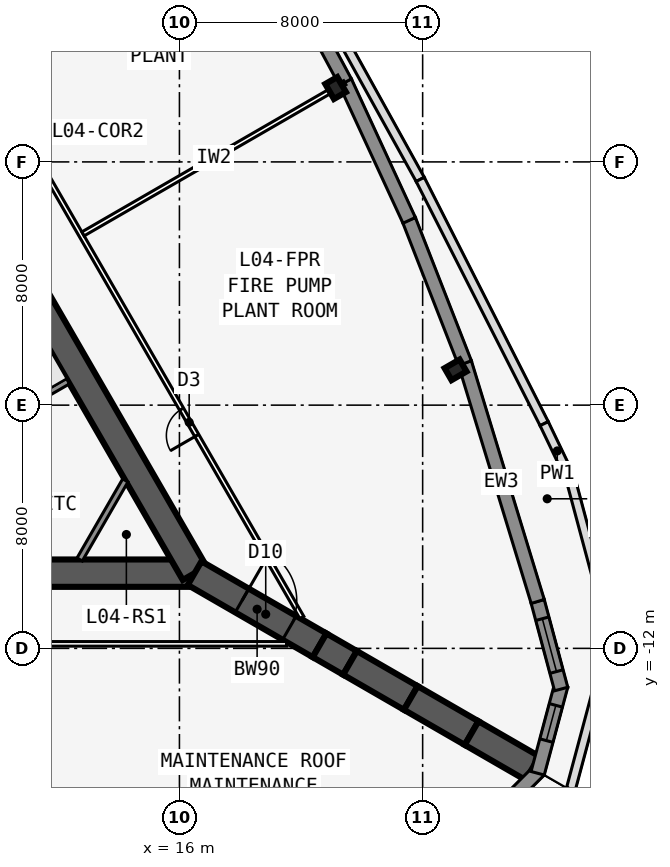
"""IFC4 building model, lengths in metres.
Left out: names, types, materials, properties, quantities, classifications, styles, units other than length and angle.
Written with IfcOpenShell. Run it as: python <this file> out.ifc"""

import sys

from ifc_helpers import new_model, si_unit, direction, frame, frame_2d, origin, origin_2d, place, context, subcontext, project, spatial, polyline, rectangle, i_section, outline, extrude, element, fill, save


model = new_model("IFC4")
c1 = context("Model", 3, precision=1e-05, world=origin(), true_north=direction((0.0, 1.0)))
c2 = subcontext(c1, "Body", "Model", "MODEL_VIEW")
j1 = project(units=[si_unit("LENGTHUNIT", "METRE"), si_unit("PLANEANGLEUNIT", "RADIAN")], contexts=[c1])
p1 = place(None, origin())
s1 = spatial("IfcSite", under=j1, at=p1, CompositionType="ELEMENT")
p2 = place(p1, origin())
s2 = spatial("IfcBuilding", under=s1, at=p2, CompositionType="ELEMENT")
p3 = place(p2, frame((0.0, 0.0, 22.5)))
s3 = spatial("IfcBuildingStorey", under=s2, at=p3, CompositionType="ELEMENT", Elevation=22.5)
p4 = place(p3, frame((-16.5, -9.526, 0.0), z_axis=(0.0, 0.0, 1.0), x_axis=(1.0, 0.0, 0.0)))
e1 = element("IfcWall", 1, at=p4, inside=s3, PredefinedType="SHEAR", context=c2, shape_type="SweptSolid", body=[
    extrude(rectangle(XDim=33.0, YDim=0.9, at=frame_2d((16.5, 0.0))), origin(), (0.0, 0.0, 1.0), 6.0),
])
p5 = place(p4, frame((14.05, 0.0, 0.0)))
e2 = element("IfcOpeningElement", 2, at=p5, cuts=e1, PredefinedType="OPENING", context=c2, shape_type="SweptSolid", body=[
    extrude(rectangle(XDim=1.8, YDim=2.13, at=frame_2d((0.9, 1.065))), frame((0.0, 0.46, 0.0), z_axis=(0.0, -1.0, 0.0), x_axis=(1.0, 0.0, 0.0)), (0.0, 0.0, 1.0), 0.92),
])
p6 = place(p3, frame((16.5, -9.526, 0.0), z_axis=(0.0, 0.0, 1.0), x_axis=(-0.499999749417, 0.866025548458, 0.0)))
e3 = element("IfcWall", 3, at=p6, inside=s3, PredefinedType="SHEAR", context=c2, shape_type="SweptSolid", body=[
    extrude(rectangle(XDim=33.0, YDim=0.9, at=frame_2d((16.5, 0.0))), origin(), (0.0, 0.0, 1.0), 6.0),
])
p7 = place(p6, frame((14.15, 0.0, 0.0)))
e4 = element("IfcOpeningElement", 4, at=p7, cuts=e3, PredefinedType="OPENING", context=c2, shape_type="SweptSolid", body=[
    extrude(rectangle(XDim=1.8, YDim=2.13, at=frame_2d((0.9, 1.065))), frame((0.0, 0.46, 0.0), z_axis=(0.0, -1.0, 0.0), x_axis=(1.0, 0.0, 0.0)), (0.0, 0.0, 1.0), 0.92),
])
p8 = place(p6, frame((12.6, 0.0, 0.0)))
e5 = element("IfcOpeningElement", 5, at=p8, cuts=e3, PredefinedType="OPENING", context=c2, shape_type="SweptSolid", body=[
    extrude(rectangle(XDim=1.0, YDim=2.13, at=frame_2d((0.5, 1.065))), frame((0.0, 0.46, 0.0), z_axis=(0.0, -1.0, 0.0), x_axis=(1.0, 0.0, 0.0)), (0.0, 0.0, 1.0), 0.92),
])
p9 = place(p3, frame((9.629, -4.775, 0.0), z_axis=(0.0, 0.0, 1.0), x_axis=(0.866022959057, 0.500004234368, 0.0)))
e6 = element("IfcWall", 6, at=p9, inside=s3, PredefinedType="SOLIDWALL", context=c2, shape_type="SweptSolid", body=[
    extrude(rectangle(XDim=3.125, YDim=0.2, at=frame_2d((1.562, 0.0))), origin(), (0.0, 0.0, 1.0), 5.835),
])
p10 = place(p3, frame((16.5, -9.526, 0.0), z_axis=(0.0, 0.0, 1.0), x_axis=(0.866031398331, -0.499989616998, 0.0)))
e7 = element("IfcWall", 7, at=p10, inside=s3, PredefinedType="SHEAR", context=c2, shape_type="SweptSolid", body=[
    extrude(rectangle(XDim=4.746, YDim=0.9, at=frame_2d((2.373, 0.0))), origin(), (0.0, 0.0, 1.0), 6.0),
])
p11 = place(p10, frame((1.8, 0.0, 0.0)))
e8 = element("IfcOpeningElement", 8, at=p11, cuts=e7, PredefinedType="OPENING", context=c2, shape_type="SweptSolid", body=[
    extrude(rectangle(XDim=1.8, YDim=2.13, at=frame_2d((0.9, 1.065))), frame((0.0, 0.46, 0.0), z_axis=(0.0, -1.0, 0.0), x_axis=(1.0, 0.0, 0.0)), (0.0, 0.0, 1.0), 0.92),
])
p12 = place(p3, frame((20.61, -11.899, 0.0), z_axis=(0.0, 0.0, 1.0), x_axis=(0.866009537788, -0.500027479704, 0.0)))
e9 = element("IfcWall", 9, at=p12, inside=s3, PredefinedType="SHEAR", context=c2, shape_type="SweptSolid", body=[
    extrude(rectangle(XDim=1.155, YDim=0.9, at=frame_2d((0.577, 0.0))), origin(), (0.0, 0.0, 1.0), 6.0),
])
for number, where, z_axis, x_axis in (
    (10, (21.61, -12.477, 0.0), (0.0, 0.0, 1.0), (0.866, -0.5, 0.0)),
    (11, (23.61, -13.631, 0.0), (0.0, 0.0, 1.0), (0.866, -0.5, 0.0)),
    (12, (25.61, -14.786, 0.0), (0.0, 0.0, 1.0), (0.866, -0.5, 0.0)),
):
    element("IfcWall", number, at=place(p3, frame(where, z_axis=z_axis, x_axis=x_axis)), inside=s3, PredefinedType="SHEAR", context=c2, shape_type="SweptSolid", body=[
        extrude(rectangle(XDim=2.309, YDim=0.9, at=frame_2d((1.155, 0.0))), origin(), (0.0, 0.0, 1.0), 6.0),
    ])
for number, where, z_axis, x_axis in (
    (13, (25.083, -2.839, 0.0), (0.0, 0.0, 1.0), (-0.5, 0.866, 0.0)),
    (14, (21.137, 6.43, 0.0), (0.0, 0.0, 1.0), (0.866, 0.5, 0.0)),
):
    element("IfcColumn", number, at=place(p3, frame(where, z_axis=z_axis, x_axis=x_axis)), inside=s3, PredefinedType="COLUMN", context=c2, shape_type="SweptSolid", body=[
        extrude(i_section(OverallWidth=0.455, OverallDepth=0.569, WebThickness=0.078, FlangeThickness=0.125, at=origin_2d()), origin(), (0.0, 0.0, 1.0), 6.0),
    ])
p13 = place(p3, frame((15.312, 8.84, 0.0), z_axis=(0.0, 0.0, 1.0), x_axis=(0.866025403784, 0.5, 0.0)))
e15 = element("IfcColumn", 15, at=p13, inside=s3, PredefinedType="COLUMN", context=c2, shape_type="SweptSolid", body=[
    extrude(rectangle(XDim=2.4, YDim=2.4, at=origin_2d()), origin(), (0.0, 0.0, 1.0), 6.0),
])
p14 = place(p3, frame((25.728, -18.12, 0.0), z_axis=(0.0, 0.0, 1.0), x_axis=(0.707025086683, 0.707188466253, 0.0)))
e16 = element("IfcWall", 16, at=p14, inside=s3, PredefinedType="SOLIDWALL", context=c2, shape_type="SweptSolid", body=[
    extrude(outline(polyline([(2.989, 0.225), (2.93, 0.225), (2.438, 0.093), (2.402, 0.225), (0.0, 0.225), (0.0, -0.225), (2.989, -0.225), (2.989, 0.225)])), origin(), (0.0, 0.0, 1.0), 5.835),
])
p15 = place(p14, frame((0.676, 0.0, 0.9)))
e17 = element("IfcOpeningElement", 17, at=p15, cuts=e16, PredefinedType="OPENING", context=c2, shape_type="SweptSolid", body=[
    extrude(rectangle(XDim=1.2, YDim=3.6, at=frame_2d((0.6, 1.8))), frame((0.0, 0.235, 0.0), z_axis=(0.0, -1.0, 0.0), x_axis=(1.0, 0.0, 0.0)), (0.0, 0.0, 1.0), 0.47),
])
p16 = place(p3, frame((27.783, -16.108, 0.0), z_axis=(0.0, 0.0, 1.0), x_axis=(0.258801419081, 0.965930548995, 0.0)))
e18 = element("IfcWall", 18, at=p16, inside=s3, PredefinedType="SOLIDWALL", context=c2, shape_type="SweptSolid", body=[
    extrude(outline(polyline([(2.989, 0.225), (0.586, 0.225), (0.551, 0.093), (0.06, 0.225), (0.0, 0.225), (0.0, -0.225), (2.989, -0.225), (2.989, 0.225)])), origin(), (0.0, 0.0, 1.0), 5.835),
])
p17 = place(p16, frame((1.113, 0.0, 0.9)))
e19 = element("IfcOpeningElement", 19, at=p17, cuts=e18, PredefinedType="OPENING", context=c2, shape_type="SweptSolid", body=[
    extrude(rectangle(XDim=1.2, YDim=3.6, at=frame_2d((0.6, 1.8))), frame((0.0, 0.235, 0.0), z_axis=(0.0, -1.0, 0.0), x_axis=(1.0, 0.0, 0.0)), (0.0, 0.0, 1.0), 0.47),
])
p18 = place(p3, frame((28.556, -13.337, 0.0), z_axis=(0.0, 0.0, 1.0), x_axis=(-0.258780998834, 0.965936019953, 0.0)))
e20 = element("IfcWall", 20, at=p18, inside=s3, PredefinedType="SOLIDWALL", context=c2, shape_type="SweptSolid", body=[
    extrude(rectangle(XDim=2.989, YDim=0.45, at=frame_2d((1.494, 0.0))), origin(), (0.0, 0.0, 1.0), 5.835),
])
p19 = place(p18, frame((0.594, 0.0, 0.9)))
e21 = element("IfcOpeningElement", 21, at=p19, cuts=e20, PredefinedType="OPENING", context=c2, shape_type="SweptSolid", body=[
    extrude(rectangle(XDim=1.8, YDim=3.6, at=frame_2d((0.9, 1.8))), frame((0.0, 0.235, 0.0), z_axis=(0.0, -1.0, 0.0), x_axis=(1.0, 0.0, 0.0)), (0.0, 0.0, 1.0), 0.47),
])
p20 = place(p3, frame((27.785, -10.458, 0.0), z_axis=(0.0, 0.0, 1.0), x_axis=(-0.291997961298, 0.956418940945, 0.0)))
e22 = element("IfcWall", 22, at=p20, inside=s3, PredefinedType="SOLIDWALL", context=c2, shape_type="SweptSolid", body=[
    extrude(outline(polyline([(0.0, 0.0), (8.211, 0.0), (8.211, 5.835), (0.0, 5.835), (0.0, 0.0)]), holes=[polyline([(6.406, 2.917), (6.327, 3.513), (6.097, 4.067), (5.732, 4.544), (5.256, 4.909), (4.701, 5.139), (4.106, 5.218), (3.51, 5.139), (2.956, 4.909), (2.479, 4.544), (2.114, 4.067), (1.884, 3.513), (1.806, 2.917), (1.884, 2.322), (2.114, 1.768), (2.479, 1.291), (2.956, 0.926), (3.51, 0.696), (4.106, 0.617), (4.701, 0.696), (5.256, 0.926), (5.732, 1.291), (6.097, 1.768), (6.327, 2.322), (6.406, 2.917)])]), frame((0.0, 0.225, 0.0), z_axis=(0.0, -1.0, 0.0), x_axis=(1.0, 0.0, 0.0)), (0.0, 0.0, 1.0), 0.45),
])
p21 = place(p3, frame((25.393, -2.621, 0.0), z_axis=(0.0, 0.0, 1.0), x_axis=(-0.363971587738, 0.931410051116, 0.0)))
e23 = element("IfcWall", 23, at=p21, inside=s3, PredefinedType="SOLIDWALL", context=c2, shape_type="SweptSolid", body=[
    extrude(outline(polyline([(0.0, 0.0), (5.058, 0.0), (5.058, 5.835), (0.0, 5.835), (0.0, 0.0)]), holes=[polyline([(4.429, 2.917), (4.364, 3.409), (4.174, 3.867), (3.872, 4.261), (3.479, 4.563), (3.021, 4.753), (2.529, 4.817), (2.037, 4.753), (1.579, 4.563), (1.185, 4.261), (0.883, 3.867), (0.694, 3.409), (0.629, 2.917), (0.694, 2.426), (0.883, 1.968), (1.185, 1.574), (1.579, 1.272), (2.037, 1.082), (2.529, 1.018), (3.021, 1.082), (3.479, 1.272), (3.872, 1.574), (4.174, 1.968), (4.364, 2.426), (4.429, 2.917)])]), frame((0.0, 0.225, 0.0), z_axis=(0.0, -1.0, 0.0), x_axis=(1.0, 0.0, 0.0)), (0.0, 0.0, 1.0), 0.45),
])
p22 = place(p3, frame((23.557, 2.077, 0.0), z_axis=(0.0, 0.0, 1.0), x_axis=(-0.419203100754, 0.907892482796, 0.0)))
e24 = element("IfcWall", 24, at=p22, inside=s3, PredefinedType="SOLIDWALL", context=c2, shape_type="SweptSolid", body=[
    extrude(outline(polyline([(0.0, 0.0), (5.021, 0.0), (5.021, 5.835), (0.0, 5.835), (0.0, 0.0)]), holes=[polyline([(4.41, 2.917), (4.346, 3.409), (4.156, 3.867), (3.854, 4.261), (3.46, 4.563), (3.002, 4.753), (2.51, 4.817), (2.019, 4.753), (1.56, 4.563), (1.167, 4.261), (0.865, 3.867), (0.675, 3.409), (0.61, 2.917), (0.675, 2.426), (0.865, 1.968), (1.167, 1.574), (1.56, 1.272), (2.019, 1.082), (2.51, 1.018), (3.002, 1.082), (3.46, 1.272), (3.854, 1.574), (4.156, 1.968), (4.346, 2.426), (4.41, 2.917)])]), frame((0.0, 0.225, 0.0), z_axis=(0.0, -1.0, 0.0), x_axis=(1.0, 0.0, 0.0)), (0.0, 0.0, 1.0), 0.45),
])
p23 = place(p3, frame((21.458, 6.624, 0.0), z_axis=(0.0, 0.0, 1.0), x_axis=(-0.473412820489, 0.880840678782, 0.0)))
e25 = element("IfcWall", 25, at=p23, inside=s3, PredefinedType="SOLIDWALL", context=c2, shape_type="SweptSolid", body=[
    extrude(outline(polyline([(0.0, 0.0), (5.002, 0.0), (5.002, 5.835), (0.0, 5.835), (0.0, 0.0)]), holes=[polyline([(4.401, 2.917), (4.336, 3.409), (4.146, 3.867), (3.845, 4.261), (3.451, 4.563), (2.993, 4.753), (2.501, 4.817), (2.01, 4.753), (1.551, 4.563), (1.158, 4.261), (0.856, 3.867), (0.666, 3.409), (0.601, 2.917), (0.666, 2.426), (0.856, 1.968), (1.158, 1.574), (1.551, 1.272), (2.01, 1.082), (2.501, 1.018), (2.993, 1.082), (3.451, 1.272), (3.845, 1.574), (4.146, 1.968), (4.336, 2.426), (4.401, 2.917)])]), frame((0.0, 0.225, 0.0), z_axis=(0.0, -1.0, 0.0), x_axis=(1.0, 0.0, 0.0)), (0.0, 0.0, 1.0), 0.45),
])
p24 = place(p3, frame((19.563, 11.295, 0.0), z_axis=(0.0, 0.0, 1.0), x_axis=(0.484315141127, -0.874893618719, 0.0)))
e26 = element("IfcWall", 26, at=p24, inside=s3, PredefinedType="PARAPET", context=c2, shape_type="SweptSolid", body=[
    extrude(rectangle(XDim=8.996, YDim=0.3, at=frame_2d((4.498, 0.0))), origin(), (0.0, 0.0, 1.0), 1.1),
])
p25 = place(p3, frame((23.92, 3.424, 0.0), z_axis=(0.0, 0.0, 1.0), x_axis=(0.452582301023, -0.891722636699, 0.0)))
e27 = element("IfcWall", 27, at=p25, inside=s3, PredefinedType="PARAPET", context=c2, shape_type="SweptSolid", body=[
    extrude(rectangle(XDim=9.009, YDim=0.3, at=frame_2d((4.504, 0.0))), origin(), (0.0, 0.0, 1.0), 1.1),
])
p26 = place(p3, frame((27.997, -4.609, 0.0), z_axis=(0.0, 0.0, 1.0), x_axis=(0.432878608611, -0.90145222292, 0.0)))
e28 = element("IfcWall", 28, at=p26, inside=s3, PredefinedType="PARAPET", context=c2, shape_type="SweptSolid", body=[
    extrude(rectangle(XDim=1.99, YDim=0.3, at=frame_2d((0.995, 0.0))), origin(), (0.0, 0.0, 1.0), 1.1),
])
p27 = place(p3, frame((28.859, -6.403, 0.0), z_axis=(0.0, 0.0, 1.0), x_axis=(0.258843788525, -0.965919195969, 0.0)))
e29 = element("IfcWall", 29, at=p27, inside=s3, PredefinedType="PARAPET", context=c2, shape_type="SweptSolid", body=[
    extrude(rectangle(XDim=5.325, YDim=0.3, at=frame_2d((2.663, 0.0))), origin(), (0.0, 0.0, 1.0), 1.1),
])
for number, where, z_axis, x_axis in (
    (30, (30.237, -11.547, 0.0), (0.0, 0.0, 1.0), (-0.259, -0.966, 0.0)),
    (31, (28.865, -16.666, 0.0), (0.0, 0.0, 1.0), (-0.707, -0.707, 0.0)),
):
    element("IfcWall", number, at=place(p3, frame(where, z_axis=z_axis, x_axis=x_axis)), inside=s3, PredefinedType="PARAPET", context=c2, shape_type="SweptSolid", body=[
        extrude(rectangle(XDim=5.299, YDim=0.3, at=frame_2d((2.649, 0.0))), origin(), (0.0, 0.0, 1.0), 1.1),
    ])
p28 = place(p3, frame((-19.527, -11.851, 0.0), z_axis=(0.0, 0.0, 1.0), x_axis=(1.0, 0.0, 0.0)))
e32 = element("IfcWall", 32, at=p28, inside=s3, PredefinedType="PARTITIONING", context=c2, shape_type="SweptSolid", body=[
    extrude(rectangle(XDim=39.054, YDim=0.15, at=frame_2d((19.527, 0.0))), origin(), (0.0, 0.0, 1.0), 5.835),
])
p29 = place(p28, frame((6.414, 0.0, 0.0)))
e33 = element("IfcOpeningElement", 33, at=p29, cuts=e32, PredefinedType="OPENING", context=c2, shape_type="SweptSolid", body=[
    extrude(rectangle(XDim=1.0, YDim=2.13, at=frame_2d((0.5, 1.065))), frame((0.0, 0.085, 0.0), z_axis=(0.0, -1.0, 0.0), x_axis=(1.0, 0.0, 0.0)), (0.0, 0.0, 1.0), 0.17),
])
p30 = place(p28, frame((16.027, 0.0, 0.0)))
e34 = element("IfcOpeningElement", 34, at=p30, cuts=e32, PredefinedType="OPENING", context=c2, shape_type="SweptSolid", body=[
    extrude(rectangle(XDim=1.0, YDim=2.13, at=frame_2d((0.5, 1.065))), frame((0.0, 0.085, 0.0), z_axis=(0.0, -1.0, 0.0), x_axis=(1.0, 0.0, 0.0)), (0.0, 0.0, 1.0), 0.17),
])
p31 = place(p28, frame((28.64, 0.0, 0.0)))
e35 = element("IfcOpeningElement", 35, at=p31, cuts=e32, PredefinedType="OPENING", context=c2, shape_type="SweptSolid", body=[
    extrude(rectangle(XDim=1.0, YDim=2.13, at=frame_2d((0.5, 1.065))), frame((0.0, 0.085, 0.0), z_axis=(0.0, -1.0, 0.0), x_axis=(1.0, 0.0, 0.0)), (0.0, 0.0, 1.0), 0.17),
])
p32 = place(p3, frame((20.027, -10.985, 0.0), z_axis=(0.0, 0.0, 1.0), x_axis=(-0.500001677587, 0.866024435227, 0.0)))
e36 = element("IfcWall", 36, at=p32, inside=s3, PredefinedType="PARTITIONING", context=c2, shape_type="SweptSolid", body=[
    extrude(rectangle(XDim=39.054, YDim=0.15, at=frame_2d((19.527, 0.0))), origin(), (0.0, 0.0, 1.0), 5.835),
])
p33 = place(p32, frame((6.914, 0.0, 0.0)))
e37 = element("IfcOpeningElement", 37, at=p33, cuts=e36, PredefinedType="OPENING", context=c2, shape_type="SweptSolid", body=[
    extrude(rectangle(XDim=1.0, YDim=2.13, at=frame_2d((0.5, 1.065))), frame((0.0, 0.085, 0.0), z_axis=(0.0, -1.0, 0.0), x_axis=(1.0, 0.0, 0.0)), (0.0, 0.0, 1.0), 0.17),
])
p34 = place(p32, frame((18.527, 0.0, 0.0)))
e38 = element("IfcOpeningElement", 38, at=p34, cuts=e36, PredefinedType="OPENING", context=c2, shape_type="SweptSolid", body=[
    extrude(rectangle(XDim=1.0, YDim=2.13, at=frame_2d((0.5, 1.065))), frame((0.0, 0.085, 0.0), z_axis=(0.0, -1.0, 0.0), x_axis=(1.0, 0.0, 0.0)), (0.0, 0.0, 1.0), 0.17),
])
p35 = place(p32, frame((30.64, 0.0, 0.0)))
e39 = element("IfcOpeningElement", 39, at=p35, cuts=e36, PredefinedType="OPENING", context=c2, shape_type="SweptSolid", body=[
    extrude(rectangle(XDim=1.0, YDim=2.13, at=frame_2d((0.5, 1.065))), frame((0.0, 0.085, 0.0), z_axis=(0.0, -1.0, 0.0), x_axis=(1.0, 0.0, 0.0)), (0.0, 0.0, 1.0), 0.17),
])
p36 = place(p3, frame((12.829, 1.633, 0.0), z_axis=(0.0, 0.0, 1.0), x_axis=(0.866026934769, 0.499997348248, 0.0)))
e40 = element("IfcWall", 40, at=p36, inside=s3, PredefinedType="PARTITIONING", context=c2, shape_type="SweptSolid", body=[
    extrude(rectangle(XDim=9.943, YDim=0.15, at=frame_2d((4.971, 0.0))), origin(), (0.0, 0.0, 1.0), 4.794),
])
p37 = place(p3, frame((14.219, -6.476, 0.0), z_axis=(0.0, 0.0, 1.0), x_axis=(-0.499952404951, -0.866052881055, 0.0)))
e41 = element("IfcWall", 41, at=p37, inside=s3, PredefinedType="SOLIDWALL", context=c2, shape_type="SweptSolid", body=[
    extrude(rectangle(XDim=3.002, YDim=0.2, at=frame_2d((1.501, 0.0))), origin(), (0.0, 0.0, 1.0), 5.835),
])
p38 = place(p17, origin())
e42 = element("IfcWindow", 42, at=p38, inside=s3, PartitioningType="SINGLE_PANEL", PredefinedType="WINDOW", context=c2, shape_type="SweptSolid", body=[
    extrude(rectangle(XDim=1.2, YDim=3.6, at=frame_2d((0.6, 1.8))), frame((0.0, 0.03, 0.0), z_axis=(0.0, -1.0, 0.0), x_axis=(1.0, 0.0, 0.0)), (0.0, 0.0, 1.0), 0.06),
])
fill(e19, e42)
p39 = place(p19, origin())
e43 = element("IfcWindow", 43, at=p39, inside=s3, PartitioningType="SINGLE_PANEL", PredefinedType="WINDOW", context=c2, shape_type="SweptSolid", body=[
    extrude(rectangle(XDim=1.8, YDim=3.6, at=frame_2d((0.9, 1.8))), frame((0.0, 0.03, 0.0), z_axis=(0.0, -1.0, 0.0), x_axis=(1.0, 0.0, 0.0)), (0.0, 0.0, 1.0), 0.06),
])
fill(e21, e43)
p40 = place(p33, origin())
e44 = element("IfcDoor", 44, at=p40, inside=s3, OperationType="SINGLE_SWING_LEFT", PredefinedType="DOOR", context=c2, shape_type="SweptSolid", body=[
    extrude(rectangle(XDim=1.0, YDim=2.13, at=frame_2d((0.5, 1.065))), frame((0.0, 0.025, 0.0), z_axis=(0.0, -1.0, 0.0), x_axis=(1.0, 0.0, 0.0)), (0.0, 0.0, 1.0), 0.05),
])
fill(e37, e44)
p41 = place(p11, origin())
e45 = element("IfcDoor", 45, at=p41, inside=s3, OperationType="DOUBLE_DOOR_DOUBLE_SWING", PredefinedType="DOOR", context=c2, shape_type="SweptSolid", body=[
    extrude(rectangle(XDim=1.8, YDim=2.13, at=frame_2d((0.9, 1.065))), frame((0.0, 0.025, 0.0), z_axis=(0.0, -1.0, 0.0), x_axis=(1.0, 0.0, 0.0)), (0.0, 0.0, 1.0), 0.05),
])
fill(e8, e45)
save(model, sys.argv[1])
